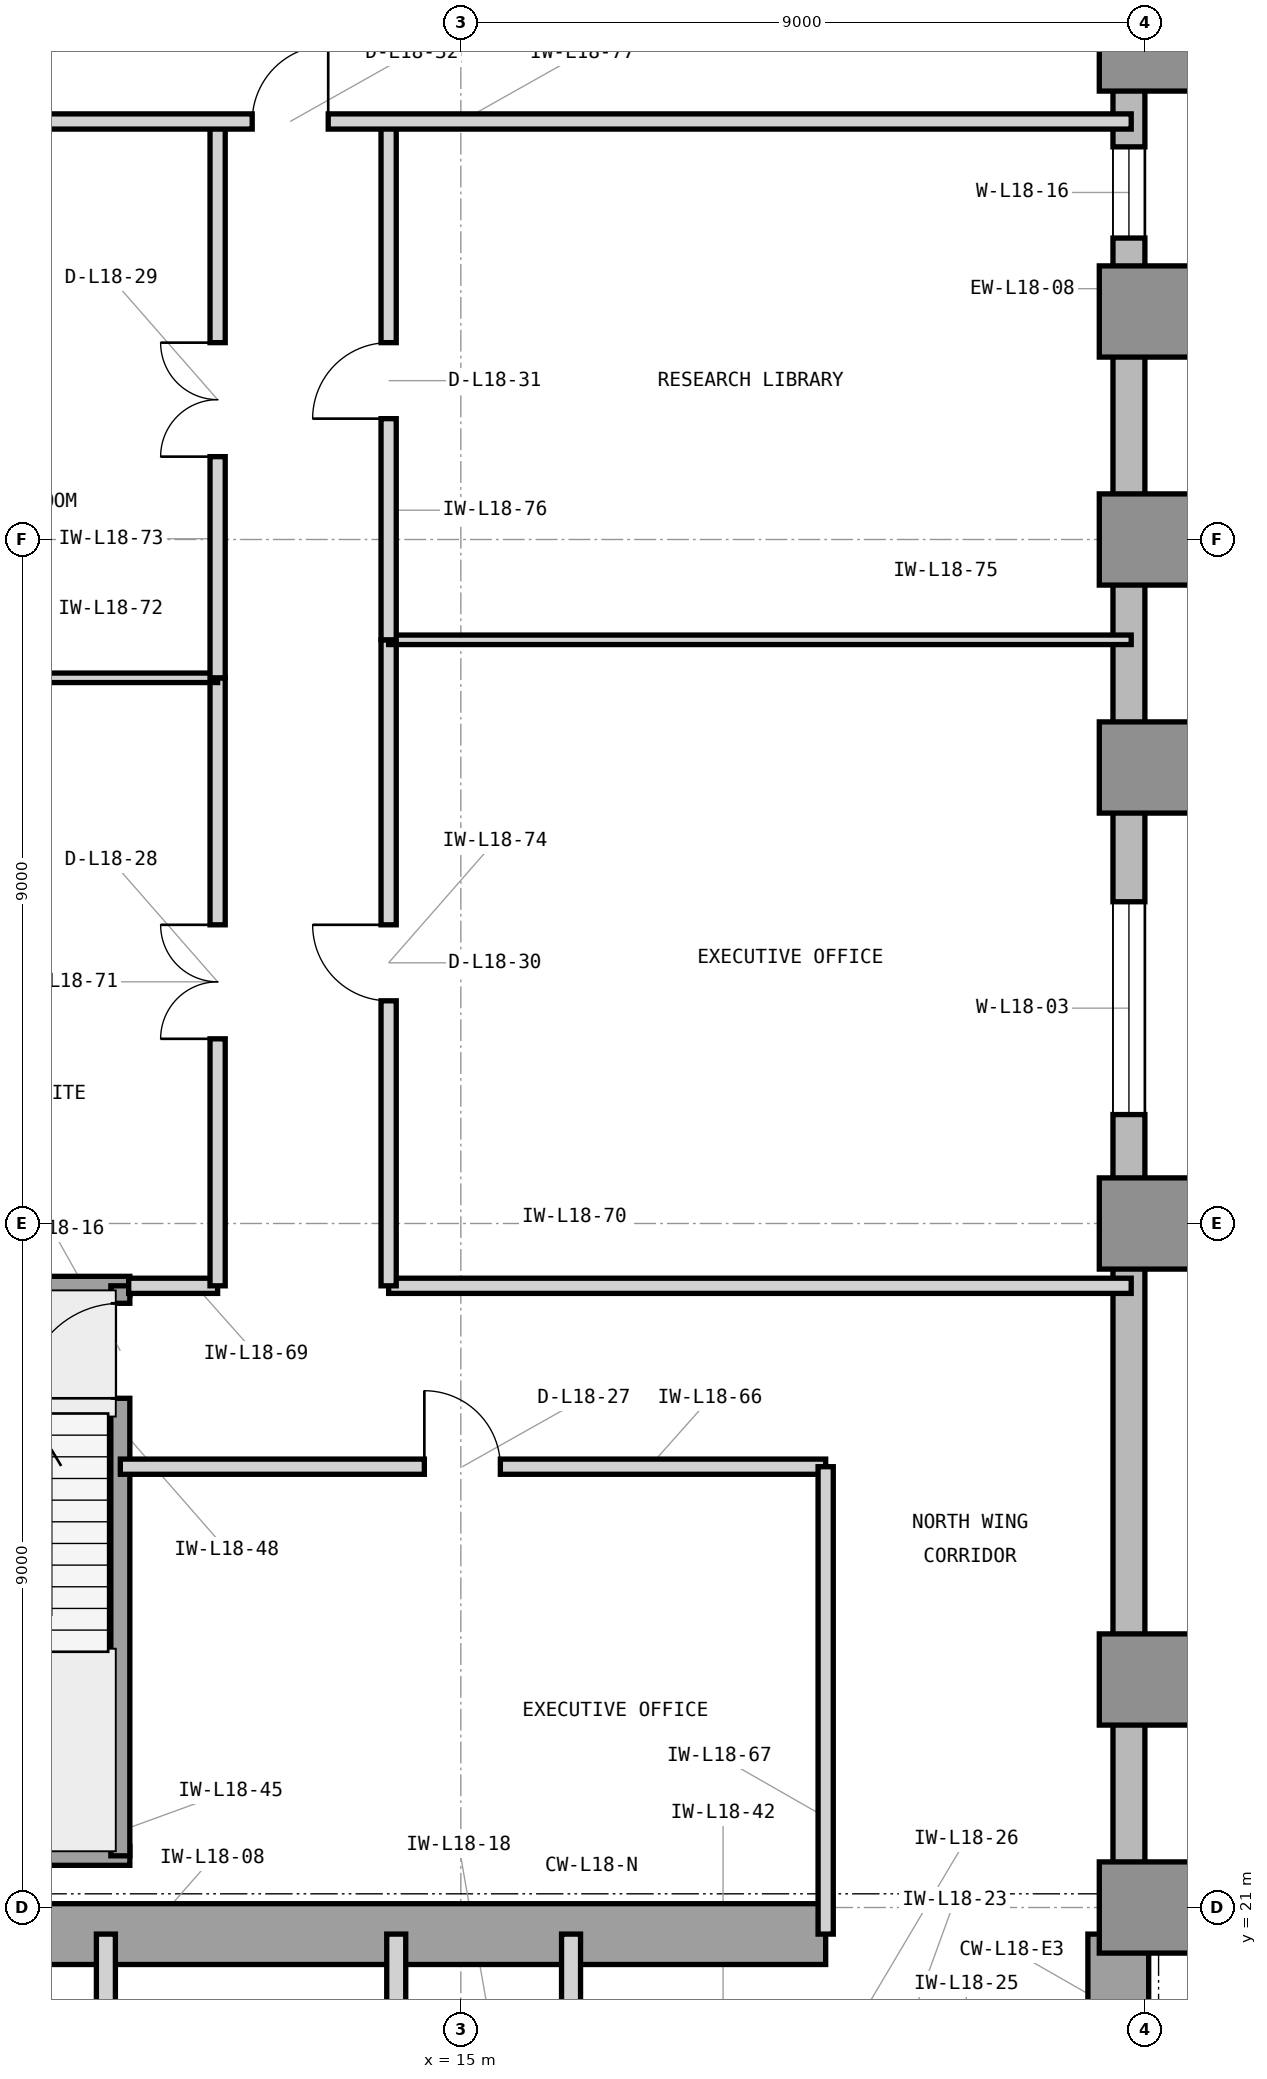
"""IFC4 building model, lengths in metres.
Left out: names, types, materials, properties, quantities, classifications, styles, units other than length and angle.
Written with IfcOpenShell. Run it as: python <this file> out.ifc"""

import sys

from ifc_helpers import new_model, si_unit, direction, frame, frame_2d, origin, origin_2d, place, context, subcontext, project, spatial, rectangle, extrude, element, fill, save


model = new_model("IFC4")
c1 = context("Model", 3, precision=1e-05, world=origin(), true_north=direction((0.0, 1.0)))
c2 = subcontext(c1, "Body", "Model", "MODEL_VIEW")
j1 = project(units=[si_unit("LENGTHUNIT", "METRE"), si_unit("PLANEANGLEUNIT", "RADIAN")], contexts=[c1])
p1 = place(None, origin())
s1 = spatial("IfcSite", under=j1, at=p1, CompositionType="ELEMENT")
p2 = place(p1, origin())
s2 = spatial("IfcBuilding", under=s1, at=p2, CompositionType="ELEMENT")
p3 = place(p2, frame((0.0, 0.0, 80.4)))
s3 = spatial("IfcBuildingStorey", under=s2, at=p3, CompositionType="ELEMENT", Elevation=80.4)
p4 = place(p3, frame((7.475, 20.65, 0.0), z_axis=(0.0, 0.0, 1.0), x_axis=(1.0, 0.0, 0.0)))
e1 = element("IfcWall", 1, at=p4, inside=s3, PredefinedType="SHEAR", context=c2, shape_type="SweptSolid", body=[
    extrude(rectangle(XDim=12.325, YDim=0.8, at=frame_2d((6.163, 0.0))), origin(), (0.0, 0.0, 1.0), 4.2),
])
p5 = place(p3, frame((23.65, 16.6, 0.0), z_axis=(0.0, 0.0, 1.0), x_axis=(0.0, 1.0, 0.0)))
e2 = element("IfcWall", 2, at=p5, inside=s3, PredefinedType="SHEAR", context=c2, shape_type="SweptSolid", body=[
    extrude(rectangle(XDim=4.05, YDim=0.8, at=frame_2d((2.025, 0.0))), origin(), (0.0, 0.0, 1.0), 4.2),
])
for number, where, z_axis, x_axis in (
    (3, (24.0, 21.0, 0.0), (0.0, 0.0, 1.0), (1.0, 0.0, 0.0)),
    (4, (24.0, 24.0, 0.0), (0.0, 0.0, 1.0), (1.0, 0.0, 0.0)),
    (5, (24.0, 30.0, 0.0), (0.0, 0.0, 1.0), (1.0, 0.0, 0.0)),
    (6, (24.0, 36.0, 0.0), (0.0, 0.0, 1.0), (1.0, 0.0, 0.0)),
    (7, (24.0, 39.0, 0.0), (0.0, 0.0, 1.0), (1.0, 0.0, 0.0)),
    (8, (24.0, 42.0, 0.0), (0.0, 0.0, 1.0), (1.0, 0.0, 0.0)),
    (9, (24.0, 45.5, 0.0), (0.0, 0.0, 1.0), (1.0, 0.0, 0.0)),
):
    element("IfcColumn", number, at=place(p3, frame(where, z_axis=z_axis, x_axis=x_axis)), inside=s3, PredefinedType="COLUMN", context=c2, shape_type="SweptSolid", body=[
        extrude(rectangle(XDim=1.2, YDim=1.2, at=origin_2d()), origin(), (0.0, 0.0, 1.0), 4.2),
    ])
p6 = place(p3, frame((64.4, 20.79, 0.0), z_axis=(0.0, 0.0, 1.0), x_axis=(-1.0, 0.0, 0.0)))
e10 = element("IfcWall", 10, at=p6, inside=s3, PredefinedType="STANDARD", context=c2, shape_type="SweptSolid", body=[
    extrude(rectangle(XDim=40.4, YDim=0.42, at=frame_2d((20.2, 0.0))), origin(), (0.0, 0.0, 1.0), 3.92),
])
p7 = place(p6, frame((38.222, 0.0, 0.85)))
e11 = element("IfcOpeningElement", 11, at=p7, cuts=e10, PredefinedType="OPENING", context=c2, shape_type="SweptSolid", body=[
    extrude(rectangle(XDim=1.2, YDim=2.45, at=frame_2d((0.6, 1.225))), frame((0.0, 0.22, 0.0), z_axis=(0.0, -1.0, 0.0), x_axis=(1.0, 0.0, 0.0)), (0.0, 0.0, 1.0), 0.44),
])
p8 = place(p6, frame((32.386, 0.0, 0.85)))
e12 = element("IfcOpeningElement", 12, at=p8, cuts=e10, PredefinedType="OPENING", context=c2, shape_type="SweptSolid", body=[
    extrude(rectangle(XDim=2.8, YDim=2.45, at=frame_2d((1.4, 1.225))), frame((0.0, 0.22, 0.0), z_axis=(0.0, -1.0, 0.0), x_axis=(1.0, 0.0, 0.0)), (0.0, 0.0, 1.0), 0.44),
])
p9 = place(p6, frame((23.386, 0.0, 0.85)))
e13 = element("IfcOpeningElement", 13, at=p9, cuts=e10, PredefinedType="OPENING", context=c2, shape_type="SweptSolid", body=[
    extrude(rectangle(XDim=2.8, YDim=2.45, at=frame_2d((1.4, 1.225))), frame((0.0, 0.22, 0.0), z_axis=(0.0, -1.0, 0.0), x_axis=(1.0, 0.0, 0.0)), (0.0, 0.0, 1.0), 0.44),
])
p10 = place(p6, frame((17.386, 0.0, 0.85)))
e14 = element("IfcOpeningElement", 14, at=p10, cuts=e10, PredefinedType="OPENING", context=c2, shape_type="SweptSolid", body=[
    extrude(rectangle(XDim=2.1, YDim=2.45, at=frame_2d((1.05, 1.225))), frame((0.0, 0.22, 0.0), z_axis=(0.0, -1.0, 0.0), x_axis=(1.0, 0.0, 0.0)), (0.0, 0.0, 1.0), 0.44),
])
p11 = place(p6, frame((8.436, 0.0, 0.85)))
e15 = element("IfcOpeningElement", 15, at=p11, cuts=e10, PredefinedType="OPENING", context=c2, shape_type="SweptSolid", body=[
    extrude(rectangle(XDim=1.2, YDim=2.45, at=frame_2d((0.6, 1.225))), frame((0.0, 0.22, 0.0), z_axis=(0.0, -1.0, 0.0), x_axis=(1.0, 0.0, 0.0)), (0.0, 0.0, 1.0), 0.44),
])
p12 = place(p3, frame((23.79, 21.0, 0.0), z_axis=(0.0, 0.0, 1.0), x_axis=(0.0, 1.0, 0.0)))
e16 = element("IfcWall", 16, at=p12, inside=s3, PredefinedType="STANDARD", context=c2, shape_type="SweptSolid", body=[
    extrude(rectangle(XDim=28.4, YDim=0.42, at=frame_2d((14.2, 0.0))), origin(), (0.0, 0.0, 1.0), 3.92),
])
p13 = place(p12, frame((10.433, 0.0, 0.85)))
e17 = element("IfcOpeningElement", 17, at=p13, cuts=e16, PredefinedType="OPENING", context=c2, shape_type="SweptSolid", body=[
    extrude(rectangle(XDim=2.8, YDim=2.45, at=frame_2d((1.4, 1.225))), frame((0.0, 0.22, 0.0), z_axis=(0.0, -1.0, 0.0), x_axis=(1.0, 0.0, 0.0)), (0.0, 0.0, 1.0), 0.44),
])
p14 = place(p12, frame((21.966, 0.0, 0.85)))
e18 = element("IfcOpeningElement", 18, at=p14, cuts=e16, PredefinedType="OPENING", context=c2, shape_type="SweptSolid", body=[
    extrude(rectangle(XDim=1.2, YDim=2.45, at=frame_2d((0.6, 1.225))), frame((0.0, 0.22, 0.0), z_axis=(0.0, -1.0, 0.0), x_axis=(1.0, 0.0, 0.0)), (0.0, 0.0, 1.0), 0.44),
])
p15 = place(p3, frame((10.33, 19.45, 0.0), z_axis=(0.0, 0.0, 1.0), x_axis=(0.0, 1.0, 0.0)))
e19 = element("IfcWall", 19, at=p15, inside=s3, PredefinedType="PARTITIONING", context=c2, shape_type="SweptSolid", body=[
    extrude(rectangle(XDim=1.2, YDim=0.25, at=frame_2d((0.6, 0.0))), origin(), (0.0, 0.0, 1.0), 2.983),
])
for number, where, z_axis, x_axis in (
    (20, (14.15, 16.7, 0.0), (0.0, 0.0, 1.0), (0.0, 1.0, 0.0)),
    (21, (16.45, 16.7, 0.0), (0.0, 0.0, 1.0), (0.0, 1.0, 0.0)),
):
    element("IfcWall", number, at=place(p3, frame(where, z_axis=z_axis, x_axis=x_axis)), inside=s3, PredefinedType="PARTITIONING", context=c2, shape_type="SweptSolid", body=[
        extrude(rectangle(XDim=3.95, YDim=0.25, at=frame_2d((1.975, 0.0))), origin(), (0.0, 0.0, 1.0), 3.91),
    ])
for number, where, z_axis, x_axis in (
    (22, (6.555, 21.68, 0.0), (0.0, 0.0, 1.0), (1.0, 0.0, 0.0)),
    (23, (6.555, 29.18, 0.0), (0.0, 0.0, 1.0), (1.0, 0.0, 0.0)),
):
    element("IfcWall", number, at=place(p3, frame(where, z_axis=z_axis, x_axis=x_axis)), inside=s3, PredefinedType="SHEAR", context=c2, shape_type="SweptSolid", body=[
        extrude(rectangle(XDim=4.09, YDim=0.25, at=frame_2d((2.045, 0.0))), origin(), (0.0, 0.0, 1.0), 4.2),
    ])
p16 = place(p3, frame((10.52, 21.68, 0.0), z_axis=(0.0, 0.0, 1.0), x_axis=(0.0, 1.0, 0.0)))
e24 = element("IfcWall", 24, at=p16, inside=s3, PredefinedType="SHEAR", context=c2, shape_type="SweptSolid", body=[
    extrude(rectangle(XDim=7.5, YDim=0.25, at=frame_2d((3.75, 0.0))), origin(), (0.0, 0.0, 1.0), 4.2),
])
p17 = place(p16, frame((6.02, 0.0, 0.0)))
e25 = element("IfcOpeningElement", 25, at=p17, cuts=e24, PredefinedType="OPENING", context=c2, shape_type="SweptSolid", body=[
    extrude(rectangle(XDim=1.25, YDim=2.2, at=frame_2d((0.625, 1.1))), frame((0.0, 0.135, 0.0), z_axis=(0.0, -1.0, 0.0), x_axis=(1.0, 0.0, 0.0)), (0.0, 0.0, 1.0), 0.27),
])
p18 = place(p3, frame((10.52, 26.8, 0.0), z_axis=(0.0, 0.0, 1.0), x_axis=(1.0, 0.0, 0.0)))
e26 = element("IfcWall", 26, at=p18, inside=s3, PredefinedType="PARTITIONING", context=c2, shape_type="SweptSolid", body=[
    extrude(rectangle(XDim=9.28, YDim=0.2, at=frame_2d((4.64, 0.0))), origin(), (0.0, 0.0, 1.0), 3.91),
])
p19 = place(p18, frame((4.0, 0.0, 0.0)))
e27 = element("IfcOpeningElement", 27, at=p19, cuts=e26, PredefinedType="OPENING", context=c2, shape_type="SweptSolid", body=[
    extrude(rectangle(XDim=1.0, YDim=2.15, at=frame_2d((0.5, 1.075))), frame((0.0, 0.11, 0.0), z_axis=(0.0, -1.0, 0.0), x_axis=(1.0, 0.0, 0.0)), (0.0, 0.0, 1.0), 0.22),
])
p20 = place(p3, frame((19.8, 20.65, 0.0), z_axis=(0.0, 0.0, 1.0), x_axis=(0.0, 1.0, 0.0)))
e28 = element("IfcWall", 28, at=p20, inside=s3, PredefinedType="PARTITIONING", context=c2, shape_type="SweptSolid", body=[
    extrude(rectangle(XDim=6.15, YDim=0.2, at=frame_2d((3.075, 0.0))), origin(), (0.0, 0.0, 1.0), 3.91),
])
p21 = place(p3, frame((10.63, 29.18, 0.0), z_axis=(0.0, 0.0, 1.0), x_axis=(1.0, 0.0, 0.0)))
e29 = element("IfcWall", 29, at=p21, inside=s3, PredefinedType="PARTITIONING", context=c2, shape_type="SweptSolid", body=[
    extrude(rectangle(XDim=1.17, YDim=0.2, at=frame_2d((0.585, 0.0))), origin(), (0.0, 0.0, 1.0), 3.91),
])
p22 = place(p3, frame((14.05, 29.18, 0.0), z_axis=(0.0, 0.0, 1.0), x_axis=(1.0, 0.0, 0.0)))
e30 = element("IfcWall", 30, at=p22, inside=s3, PredefinedType="PARTITIONING", context=c2, shape_type="SweptSolid", body=[
    extrude(rectangle(XDim=9.77, YDim=0.2, at=frame_2d((4.885, 0.0))), origin(), (0.0, 0.0, 1.0), 3.91),
])
p23 = place(p3, frame((11.8, 29.18, 0.0), z_axis=(0.0, 0.0, 1.0), x_axis=(0.0, 1.0, 0.0)))
e31 = element("IfcWall", 31, at=p23, inside=s3, PredefinedType="PARTITIONING", context=c2, shape_type="SweptSolid", body=[
    extrude(rectangle(XDim=8.0, YDim=0.2, at=frame_2d((4.0, 0.0))), origin(), (0.0, 0.0, 1.0), 3.91),
])
p24 = place(p23, frame((3.25, 0.0, 0.0)))
e32 = element("IfcOpeningElement", 32, at=p24, cuts=e31, PredefinedType="OPENING", context=c2, shape_type="SweptSolid", body=[
    extrude(rectangle(XDim=1.5, YDim=2.3, at=frame_2d((0.75, 1.15))), frame((0.0, 0.11, 0.0), z_axis=(0.0, -1.0, 0.0), x_axis=(1.0, 0.0, 0.0)), (0.0, 0.0, 1.0), 0.22),
])
p25 = place(p3, frame((6.18, 37.18, 0.0), z_axis=(0.0, 0.0, 1.0), x_axis=(1.0, 0.0, 0.0)))
e33 = element("IfcWall", 33, at=p25, inside=s3, PredefinedType="PARTITIONING", context=c2, shape_type="SweptSolid", body=[
    extrude(rectangle(XDim=5.62, YDim=0.125, at=frame_2d((2.81, 0.0))), origin(), (0.0, 0.0, 1.0), 3.91),
])
p26 = place(p3, frame((11.8, 37.18, 0.0), z_axis=(0.0, 0.0, 1.0), x_axis=(0.0, 1.0, 0.0)))
e34 = element("IfcWall", 34, at=p26, inside=s3, PredefinedType="PARTITIONING", context=c2, shape_type="SweptSolid", body=[
    extrude(rectangle(XDim=7.32, YDim=0.2, at=frame_2d((3.66, 0.0))), origin(), (0.0, 0.0, 1.0), 3.91),
])
p27 = place(p26, frame((2.91, 0.0, 0.0)))
e35 = element("IfcOpeningElement", 35, at=p27, cuts=e34, PredefinedType="OPENING", context=c2, shape_type="SweptSolid", body=[
    extrude(rectangle(XDim=1.5, YDim=2.3, at=frame_2d((0.75, 1.15))), frame((0.0, 0.11, 0.0), z_axis=(0.0, -1.0, 0.0), x_axis=(1.0, 0.0, 0.0)), (0.0, 0.0, 1.0), 0.22),
])
p28 = place(p3, frame((14.05, 29.18, 0.0), z_axis=(0.0, 0.0, 1.0), x_axis=(0.0, 1.0, 0.0)))
e36 = element("IfcWall", 36, at=p28, inside=s3, PredefinedType="PARTITIONING", context=c2, shape_type="SweptSolid", body=[
    extrude(rectangle(XDim=8.5, YDim=0.2, at=frame_2d((4.25, 0.0))), origin(), (0.0, 0.0, 1.0), 3.91),
])
p29 = place(p28, frame((3.75, 0.0, 0.0)))
e37 = element("IfcOpeningElement", 37, at=p29, cuts=e36, PredefinedType="OPENING", context=c2, shape_type="SweptSolid", body=[
    extrude(rectangle(XDim=1.0, YDim=2.15, at=frame_2d((0.5, 1.075))), frame((0.0, 0.11, 0.0), z_axis=(0.0, -1.0, 0.0), x_axis=(1.0, 0.0, 0.0)), (0.0, 0.0, 1.0), 0.22),
])
p30 = place(p3, frame((14.05, 37.68, 0.0), z_axis=(0.0, 0.0, 1.0), x_axis=(1.0, 0.0, 0.0)))
e38 = element("IfcWall", 38, at=p30, inside=s3, PredefinedType="PARTITIONING", context=c2, shape_type="SweptSolid", body=[
    extrude(rectangle(XDim=9.77, YDim=0.125, at=frame_2d((4.885, 0.0))), origin(), (0.0, 0.0, 1.0), 3.91),
])
p31 = place(p3, frame((14.05, 37.68, 0.0), z_axis=(0.0, 0.0, 1.0), x_axis=(0.0, 1.0, 0.0)))
e39 = element("IfcWall", 39, at=p31, inside=s3, PredefinedType="PARTITIONING", context=c2, shape_type="SweptSolid", body=[
    extrude(rectangle(XDim=6.82, YDim=0.2, at=frame_2d((3.41, 0.0))), origin(), (0.0, 0.0, 1.0), 3.91),
])
p32 = place(p31, frame((2.91, 0.0, 0.0)))
e40 = element("IfcOpeningElement", 40, at=p32, cuts=e39, PredefinedType="OPENING", context=c2, shape_type="SweptSolid", body=[
    extrude(rectangle(XDim=1.0, YDim=2.15, at=frame_2d((0.5, 1.075))), frame((0.0, 0.11, 0.0), z_axis=(0.0, -1.0, 0.0), x_axis=(1.0, 0.0, 0.0)), (0.0, 0.0, 1.0), 0.22),
])
p33 = place(p3, frame((6.18, 44.5, 0.0), z_axis=(0.0, 0.0, 1.0), x_axis=(1.0, 0.0, 0.0)))
e41 = element("IfcWall", 41, at=p33, inside=s3, PredefinedType="PARTITIONING", context=c2, shape_type="SweptSolid", body=[
    extrude(rectangle(XDim=17.64, YDim=0.2, at=frame_2d((8.82, 0.0))), origin(), (0.0, 0.0, 1.0), 3.91),
])
p34 = place(p33, frame((6.075, 0.0, 0.0)))
e42 = element("IfcOpeningElement", 42, at=p34, cuts=e41, PredefinedType="OPENING", context=c2, shape_type="SweptSolid", body=[
    extrude(rectangle(XDim=1.0, YDim=2.15, at=frame_2d((0.5, 1.075))), frame((0.0, 0.11, 0.0), z_axis=(0.0, -1.0, 0.0), x_axis=(1.0, 0.0, 0.0)), (0.0, 0.0, 1.0), 0.22),
])
p35 = place(p13, origin())
e43 = element("IfcWindow", 43, at=p35, inside=s3, PartitioningType="SINGLE_PANEL", PredefinedType="WINDOW", context=c2, shape_type="SweptSolid", body=[
    extrude(rectangle(XDim=2.8, YDim=2.45, at=frame_2d((1.4, 1.225))), frame((0.0, 0.11, 0.0), z_axis=(0.0, -1.0, 0.0), x_axis=(1.0, 0.0, 0.0)), (0.0, 0.0, 1.0), 0.06),
])
fill(e17, e43)
p36 = place(p17, origin())
e44 = element("IfcDoor", 44, at=p36, inside=s3, OperationType="SINGLE_SWING_LEFT", PredefinedType="DOOR", context=c2, shape_type="SweptSolid", body=[
    extrude(rectangle(XDim=1.25, YDim=2.2, at=frame_2d((0.625, 1.1))), frame((0.0, 0.025, 0.0), z_axis=(0.0, -1.0, 0.0), x_axis=(1.0, 0.0, 0.0)), (0.0, 0.0, 1.0), 0.05),
])
fill(e25, e44)
p37 = place(p19, origin())
e45 = element("IfcDoor", 45, at=p37, inside=s3, OperationType="SINGLE_SWING_LEFT", PredefinedType="DOOR", context=c2, shape_type="SweptSolid", body=[
    extrude(rectangle(XDim=1.0, YDim=2.15, at=frame_2d((0.5, 1.075))), frame((0.0, 0.025, 0.0), z_axis=(0.0, -1.0, 0.0), x_axis=(1.0, 0.0, 0.0)), (0.0, 0.0, 1.0), 0.05),
])
fill(e27, e45)
p38 = place(p24, origin())
e46 = element("IfcDoor", 46, at=p38, inside=s3, OperationType="DOUBLE_DOOR_SINGLE_SWING", PredefinedType="DOOR", context=c2, shape_type="SweptSolid", body=[
    extrude(rectangle(XDim=1.5, YDim=2.3, at=frame_2d((0.75, 1.15))), frame((0.0, 0.025, 0.0), z_axis=(0.0, -1.0, 0.0), x_axis=(1.0, 0.0, 0.0)), (0.0, 0.0, 1.0), 0.05),
])
fill(e32, e46)
p39 = place(p27, origin())
e47 = element("IfcDoor", 47, at=p39, inside=s3, OperationType="DOUBLE_DOOR_SINGLE_SWING", PredefinedType="DOOR", context=c2, shape_type="SweptSolid", body=[
    extrude(rectangle(XDim=1.5, YDim=2.3, at=frame_2d((0.75, 1.15))), frame((0.0, 0.025, 0.0), z_axis=(0.0, -1.0, 0.0), x_axis=(1.0, 0.0, 0.0)), (0.0, 0.0, 1.0), 0.05),
])
fill(e35, e47)
p40 = place(p29, origin())
e48 = element("IfcDoor", 48, at=p40, inside=s3, OperationType="SINGLE_SWING_RIGHT", PredefinedType="DOOR", context=c2, shape_type="SweptSolid", body=[
    extrude(rectangle(XDim=1.0, YDim=2.15, at=frame_2d((0.5, 1.075))), frame((0.0, 0.025, 0.0), z_axis=(0.0, -1.0, 0.0), x_axis=(1.0, 0.0, 0.0)), (0.0, 0.0, 1.0), 0.05),
])
fill(e37, e48)
p41 = place(p32, origin())
e49 = element("IfcDoor", 49, at=p41, inside=s3, OperationType="SINGLE_SWING_LEFT", PredefinedType="DOOR", context=c2, shape_type="SweptSolid", body=[
    extrude(rectangle(XDim=1.0, YDim=2.15, at=frame_2d((0.5, 1.075))), frame((0.0, 0.025, 0.0), z_axis=(0.0, -1.0, 0.0), x_axis=(1.0, 0.0, 0.0)), (0.0, 0.0, 1.0), 0.05),
])
fill(e40, e49)
p42 = place(p34, origin())
e50 = element("IfcDoor", 50, at=p42, inside=s3, OperationType="SINGLE_SWING_RIGHT", PredefinedType="DOOR", context=c2, shape_type="SweptSolid", body=[
    extrude(rectangle(XDim=1.0, YDim=2.15, at=frame_2d((0.5, 1.075))), frame((0.0, 0.025, 0.0), z_axis=(0.0, -1.0, 0.0), x_axis=(1.0, 0.0, 0.0)), (0.0, 0.0, 1.0), 0.05),
])
fill(e42, e50)
p43 = place(p14, origin())
e51 = element("IfcWindow", 51, at=p43, inside=s3, PartitioningType="SINGLE_PANEL", PredefinedType="WINDOW", context=c2, shape_type="SweptSolid", body=[
    extrude(rectangle(XDim=1.2, YDim=2.45, at=frame_2d((0.6, 1.225))), frame((0.0, 0.11, 0.0), z_axis=(0.0, -1.0, 0.0), x_axis=(1.0, 0.0, 0.0)), (0.0, 0.0, 1.0), 0.06),
])
fill(e18, e51)
save(model, sys.argv[1])
